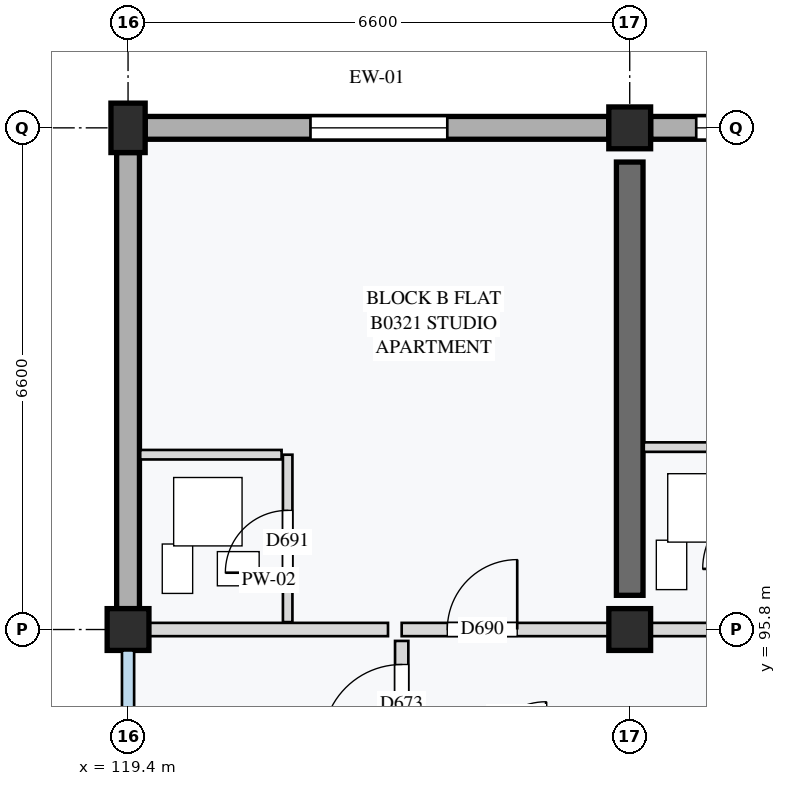
"""IFC4 building model, lengths in metres.
Left out: names, types, materials, properties, quantities, classifications, styles, units other than length and angle.
Written with IfcOpenShell. Run it as: python <this file> out.ifc"""

import sys

from ifc_helpers import new_model, si_unit, direction, frame, frame_2d, origin, origin_2d, place, context, subcontext, project, spatial, rectangle, extrude, element, fill, save


model = new_model("IFC4")
c1 = context("Model", 3, precision=1e-05, world=origin(), true_north=direction((0.0, 1.0)))
c2 = subcontext(c1, "Body", "Model", "MODEL_VIEW")
j1 = project(units=[si_unit("LENGTHUNIT", "METRE"), si_unit("PLANEANGLEUNIT", "RADIAN")], contexts=[c1])
p1 = place(None, origin())
s1 = spatial("IfcSite", under=j1, at=p1, CompositionType="ELEMENT")
p2 = place(p1, origin())
s2 = spatial("IfcBuilding", under=s1, at=p2, CompositionType="ELEMENT")
p3 = place(p2, frame((0.0, 0.0, 11.6)))
s3 = spatial("IfcBuildingStorey", under=s2, at=p3, CompositionType="ELEMENT", Elevation=11.6)
p4 = place(p3, frame((119.4, 95.8, 0.0), z_axis=(0.0, 0.0, 1.0), x_axis=(1.0, 0.0, 0.0)))
e1 = element("IfcColumn", 1, at=p4, inside=s3, PredefinedType="COLUMN", context=c2, shape_type="SweptSolid", body=[
    extrude(rectangle(XDim=0.55, YDim=0.55, at=origin_2d()), origin(), (0.0, 0.0, 1.0), 3.2),
])
p5 = place(p3, frame((119.4, 102.4, 0.0), z_axis=(0.0, 0.0, 1.0), x_axis=(1.0, 0.0, 0.0)))
e2 = element("IfcColumn", 2, at=p5, inside=s3, PredefinedType="COLUMN", context=c2, shape_type="SweptSolid", body=[
    extrude(rectangle(XDim=0.45, YDim=0.65, at=origin_2d()), origin(), (0.0, 0.0, 1.0), 3.2),
])
for number, where, z_axis, x_axis in (
    (3, (126.0, 95.8, 0.0), (0.0, 0.0, 1.0), (1.0, 0.0, 0.0)),
    (4, (126.0, 102.4, 0.0), (0.0, 0.0, 1.0), (1.0, 0.0, 0.0)),
):
    element("IfcColumn", number, at=place(p3, frame(where, z_axis=z_axis, x_axis=x_axis)), inside=s3, PredefinedType="COLUMN", context=c2, shape_type="SweptSolid", body=[
        extrude(rectangle(XDim=0.55, YDim=0.55, at=origin_2d()), origin(), (0.0, 0.0, 1.0), 3.2),
    ])
p6 = place(p3, frame((126.0, 96.25, 0.0), z_axis=(0.0, 0.0, 1.0), x_axis=(0.0, 1.0, 0.0)))
e5 = element("IfcWall", 5, at=p6, inside=s3, PredefinedType="SHEAR", context=c2, shape_type="SweptSolid", body=[
    extrude(rectangle(XDim=5.7, YDim=0.35, at=frame_2d((2.85, 0.0))), origin(), (0.0, 0.0, 1.0), 2.96),
])
p7 = place(p3, frame((119.625, 102.4, 0.0), z_axis=(0.0, 0.0, 1.0), x_axis=(1.0, 0.0, 0.0)))
e6 = element("IfcWall", 6, at=p7, inside=s3, PredefinedType="STANDARD", context=c2, shape_type="SweptSolid", body=[
    extrude(rectangle(XDim=6.1, YDim=0.3, at=frame_2d((3.05, 0.0))), origin(), (0.0, 0.0, 1.0), 2.6),
])
p8 = place(p7, frame((2.175, 0.0, 0.85)))
e7 = element("IfcOpeningElement", 7, at=p8, cuts=e6, PredefinedType="OPENING", context=c2, shape_type="SweptSolid", body=[
    extrude(rectangle(XDim=1.8, YDim=1.35, at=frame_2d((0.9, 0.675))), frame((0.0, 0.16, 0.0), z_axis=(0.0, -1.0, 0.0), x_axis=(1.0, 0.0, 0.0)), (0.0, 0.0, 1.0), 0.32),
])
p9 = place(p3, frame((126.275, 102.4, 0.0), z_axis=(0.0, 0.0, 1.0), x_axis=(1.0, 0.0, 0.0)))
e8 = element("IfcWall", 8, at=p9, inside=s3, PredefinedType="STANDARD", context=c2, shape_type="SweptSolid", body=[
    extrude(rectangle(XDim=6.05, YDim=0.3, at=frame_2d((3.025, 0.0))), origin(), (0.0, 0.0, 1.0), 2.6),
])
p10 = place(p9, frame((0.6, 0.0, 0.85)))
e9 = element("IfcOpeningElement", 9, at=p10, cuts=e8, PredefinedType="OPENING", context=c2, shape_type="SweptSolid", body=[
    extrude(rectangle(XDim=1.8, YDim=1.35, at=frame_2d((0.9, 0.675))), frame((0.0, 0.16, 0.0), z_axis=(0.0, -1.0, 0.0), x_axis=(1.0, 0.0, 0.0)), (0.0, 0.0, 1.0), 0.32),
])
p11 = place(p9, frame((4.025, 0.0, 0.85)))
e10 = element("IfcOpeningElement", 10, at=p11, cuts=e8, PredefinedType="OPENING", context=c2, shape_type="SweptSolid", body=[
    extrude(rectangle(XDim=1.5, YDim=1.35, at=frame_2d((0.75, 0.675))), frame((0.0, 0.16, 0.0), z_axis=(0.0, -1.0, 0.0), x_axis=(1.0, 0.0, 0.0)), (0.0, 0.0, 1.0), 0.32),
])
p12 = place(p3, frame((119.4, 96.075, 0.0), z_axis=(0.0, 0.0, 1.0), x_axis=(0.0, 1.0, 0.0)))
e11 = element("IfcWall", 11, at=p12, inside=s3, PredefinedType="STANDARD", context=c2, shape_type="SweptSolid", body=[
    extrude(rectangle(XDim=6.0, YDim=0.3, at=frame_2d((3.0, 0.0))), origin(), (0.0, 0.0, 1.0), 2.65),
])
p13 = place(p3, frame((123.0, 92.65, 0.0), z_axis=(0.0, 0.0, 1.0), x_axis=(0.0, 1.0, 0.0)))
e12 = element("IfcWall", 12, at=p13, inside=s3, PredefinedType="PARTITIONING", context=c2, shape_type="SweptSolid", body=[
    extrude(rectangle(XDim=3.0, YDim=0.175, at=frame_2d((1.5, 0.0))), origin(), (0.0, 0.0, 1.0), 2.96),
])
p14 = place(p13, frame((1.65, 0.0, 0.0)))
e13 = element("IfcOpeningElement", 13, at=p14, cuts=e12, PredefinedType="OPENING", context=c2, shape_type="SweptSolid", body=[
    extrude(rectangle(XDim=1.04, YDim=2.12, at=frame_2d((0.52, 1.06))), frame((0.0, 0.097, 0.0), z_axis=(0.0, -1.0, 0.0), x_axis=(1.0, 0.0, 0.0)), (0.0, 0.0, 1.0), 0.195),
])
p15 = place(p3, frame((119.68, 95.8, 0.0), z_axis=(0.0, 0.0, 1.0), x_axis=(1.0, 0.0, 0.0)))
e14 = element("IfcWall", 14, at=p15, inside=s3, PredefinedType="PARTITIONING", context=c2, shape_type="SweptSolid", body=[
    extrude(rectangle(XDim=3.14, YDim=0.175, at=frame_2d((1.57, 0.0))), origin(), (0.0, 0.0, 1.0), 2.55),
])
p16 = place(p3, frame((123.0, 95.8, 0.0), z_axis=(0.0, 0.0, 1.0), x_axis=(1.0, 0.0, 0.0)))
e15 = element("IfcWall", 15, at=p16, inside=s3, PredefinedType="PARTITIONING", context=c2, shape_type="SweptSolid", body=[
    extrude(rectangle(XDim=3.0, YDim=0.175, at=frame_2d((1.5, 0.0))), origin(), (0.0, 0.0, 1.0), 2.55),
])
p17 = place(p16, frame((0.6, 0.0, 0.0)))
e16 = element("IfcOpeningElement", 16, at=p17, cuts=e15, PredefinedType="OPENING", context=c2, shape_type="SweptSolid", body=[
    extrude(rectangle(XDim=0.92, YDim=2.14, at=frame_2d((0.46, 1.07))), frame((0.0, 0.097, 0.0), z_axis=(0.0, -1.0, 0.0), x_axis=(1.0, 0.0, 0.0)), (0.0, 0.0, 1.0), 0.195),
])
p18 = place(p3, frame((121.5, 95.897, 0.0), z_axis=(0.0, 0.0, 1.0), x_axis=(0.0, 1.0, 0.0)))
e17 = element("IfcWall", 17, at=p18, inside=s3, PredefinedType="PARTITIONING", context=c2, shape_type="SweptSolid", body=[
    extrude(rectangle(XDim=2.203, YDim=0.125, at=frame_2d((1.101, 0.0))), origin(), (0.0, 0.0, 1.0), 2.96),
])
p19 = place(p18, frame((0.65, 0.0, 0.0)))
e18 = element("IfcOpeningElement", 18, at=p19, cuts=e17, PredefinedType="OPENING", context=c2, shape_type="SweptSolid", body=[
    extrude(rectangle(XDim=0.82, YDim=2.05, at=frame_2d((0.41, 1.025))), frame((0.0, 0.073, 0.0), z_axis=(0.0, -1.0, 0.0), x_axis=(1.0, 0.0, 0.0)), (0.0, 0.0, 1.0), 0.145),
])
p20 = place(p3, frame((119.56, 98.1, 0.0), z_axis=(0.0, 0.0, 1.0), x_axis=(1.0, 0.0, 0.0)))
e19 = element("IfcWall", 19, at=p20, inside=s3, PredefinedType="PARTITIONING", context=c2, shape_type="SweptSolid", body=[
    extrude(rectangle(XDim=1.86, YDim=0.125, at=frame_2d((0.93, 0.0))), origin(), (0.0, 0.0, 1.0), 2.96),
])
p21 = place(p3, frame((126.0, 95.8, 0.0), z_axis=(0.0, 0.0, 1.0), x_axis=(1.0, 0.0, 0.0)))
e20 = element("IfcWall", 20, at=p21, inside=s3, PredefinedType="PARTITIONING", context=c2, shape_type="SweptSolid", body=[
    extrude(rectangle(XDim=6.6, YDim=0.175, at=frame_2d((3.3, 0.0))), origin(), (0.0, 0.0, 1.0), 2.55),
])
p22 = place(p21, frame((3.85, 0.0, 0.0)))
e21 = element("IfcOpeningElement", 21, at=p22, cuts=e20, PredefinedType="OPENING", context=c2, shape_type="SweptSolid", body=[
    extrude(rectangle(XDim=0.95, YDim=2.1, at=frame_2d((0.475, 1.05))), frame((0.0, 0.097, 0.0), z_axis=(0.0, -1.0, 0.0), x_axis=(1.0, 0.0, 0.0)), (0.0, 0.0, 1.0), 0.195),
])
p23 = place(p3, frame((126.185, 98.2, 0.0), z_axis=(0.0, 0.0, 1.0), x_axis=(1.0, 0.0, 0.0)))
e22 = element("IfcWall", 22, at=p23, inside=s3, PredefinedType="PARTITIONING", context=c2, shape_type="SweptSolid", body=[
    extrude(rectangle(XDim=1.635, YDim=0.125, at=frame_2d((0.817, 0.0))), origin(), (0.0, 0.0, 1.0), 2.96),
])
p24 = place(p8, origin())
e23 = element("IfcWindow", 23, at=p24, inside=s3, PartitioningType="SINGLE_PANEL", PredefinedType="WINDOW", context=c2, shape_type="SweptSolid", body=[
    extrude(rectangle(XDim=1.8, YDim=1.35, at=frame_2d((0.9, 0.675))), frame((0.0, 0.03, 0.0), z_axis=(0.0, -1.0, 0.0), x_axis=(1.0, 0.0, 0.0)), (0.0, 0.0, 1.0), 0.06),
])
fill(e7, e23)
p25 = place(p10, origin())
e24 = element("IfcWindow", 24, at=p25, inside=s3, PartitioningType="SINGLE_PANEL", PredefinedType="WINDOW", context=c2, shape_type="SweptSolid", body=[
    extrude(rectangle(XDim=1.8, YDim=1.35, at=frame_2d((0.9, 0.675))), frame((0.0, 0.03, 0.0), z_axis=(0.0, -1.0, 0.0), x_axis=(1.0, 0.0, 0.0)), (0.0, 0.0, 1.0), 0.06),
])
fill(e9, e24)
p26 = place(p14, origin())
e25 = element("IfcDoor", 25, at=p26, inside=s3, OperationType="SINGLE_SWING_LEFT", PredefinedType="DOOR", context=c2, shape_type="SweptSolid", body=[
    extrude(rectangle(XDim=1.04, YDim=2.12, at=frame_2d((0.52, 1.06))), frame((0.0, 0.025, 0.0), z_axis=(0.0, -1.0, 0.0), x_axis=(1.0, 0.0, 0.0)), (0.0, 0.0, 1.0), 0.05),
])
fill(e13, e25)
p27 = place(p17, origin())
e26 = element("IfcDoor", 26, at=p27, inside=s3, OperationType="SINGLE_SWING_RIGHT", PredefinedType="DOOR", context=c2, shape_type="SweptSolid", body=[
    extrude(rectangle(XDim=0.92, YDim=2.14, at=frame_2d((0.46, 1.07))), frame((0.0, 0.025, 0.0), z_axis=(0.0, -1.0, 0.0), x_axis=(1.0, 0.0, 0.0)), (0.0, 0.0, 1.0), 0.05),
])
fill(e16, e26)
p28 = place(p19, origin())
e27 = element("IfcDoor", 27, at=p28, inside=s3, OperationType="SINGLE_SWING_LEFT", PredefinedType="DOOR", context=c2, shape_type="SweptSolid", body=[
    extrude(rectangle(XDim=0.82, YDim=2.05, at=frame_2d((0.41, 1.025))), frame((0.0, 0.025, 0.0), z_axis=(0.0, -1.0, 0.0), x_axis=(1.0, 0.0, 0.0)), (0.0, 0.0, 1.0), 0.05),
])
fill(e18, e27)
save(model, sys.argv[1])
